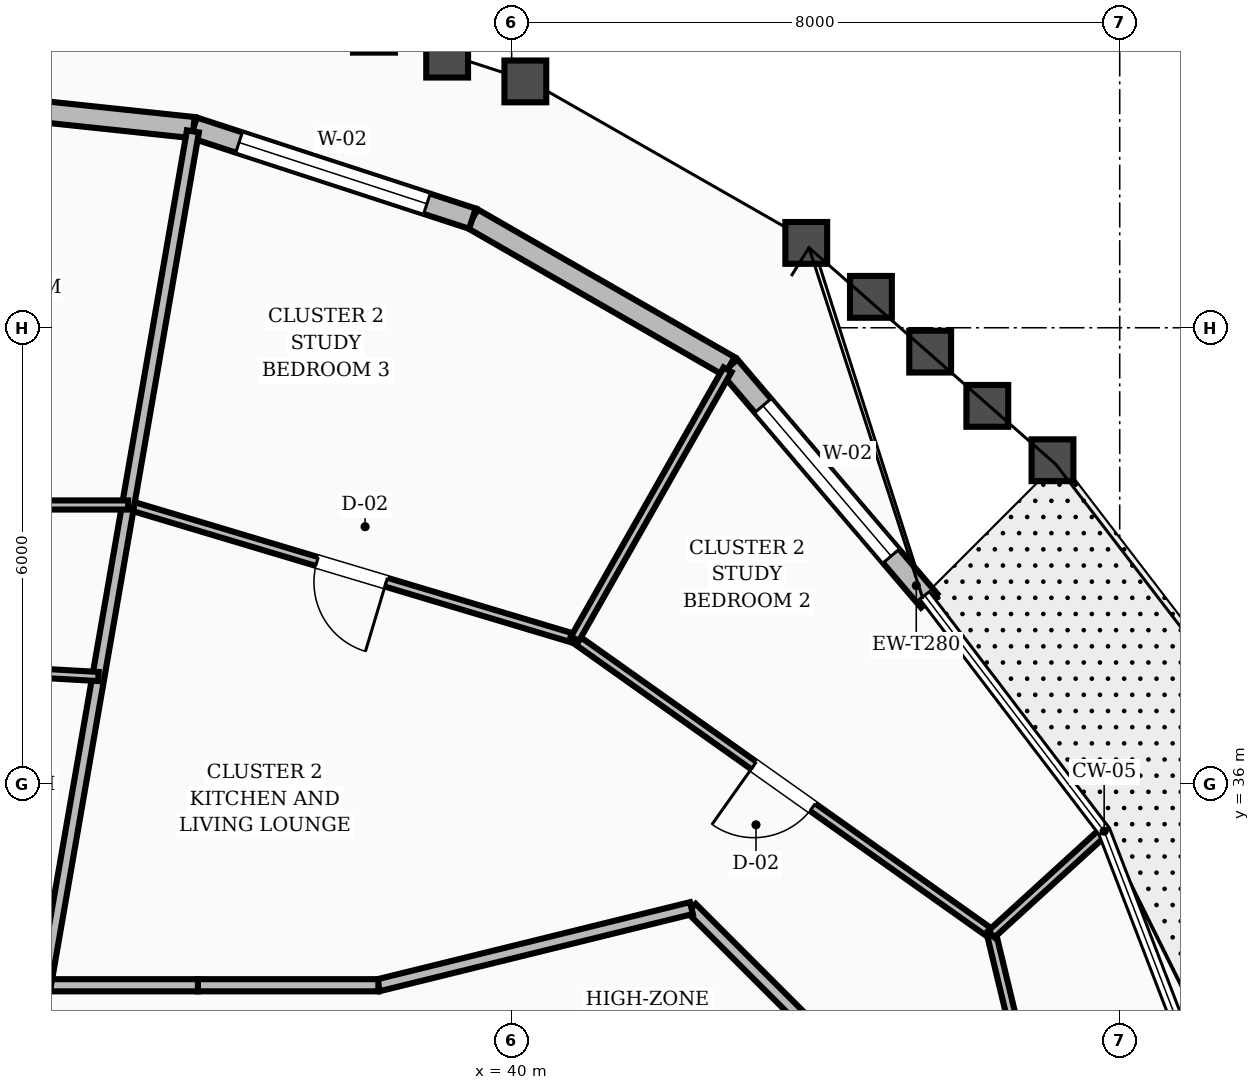
"""IFC4 building model, lengths in metres.
Left out: names, types, materials, properties, quantities, classifications, styles, units other than length and angle.
Written with IfcOpenShell. Run it as: python <this file> out.ifc"""

import sys

from ifc_helpers import new_model, si_unit, direction, frame, frame_2d, origin, place, context, subcontext, project, spatial, rectangle, extrude, element, fill, save


model = new_model("IFC4")
c1 = context("Model", 3, precision=1e-05, world=origin(), true_north=direction((0.0, 1.0)))
c2 = subcontext(c1, "Body", "Model", "MODEL_VIEW")
j1 = project(units=[si_unit("LENGTHUNIT", "METRE"), si_unit("PLANEANGLEUNIT", "RADIAN")], contexts=[c1])
p1 = place(None, origin())
s1 = spatial("IfcSite", under=j1, at=p1, CompositionType="ELEMENT")
p2 = place(p1, origin())
s2 = spatial("IfcBuilding", under=s1, at=p2, CompositionType="ELEMENT")
p3 = place(p2, frame((0.0, 0.0, 268.8)))
s3 = spatial("IfcBuildingStorey", under=s2, at=p3, CompositionType="ELEMENT", Elevation=268.8)
p4 = place(p3, frame((45.492, 38.409, 0.0), z_axis=(0.0, 0.0, 1.0), x_axis=(-0.648688961416, 0.761053632365, 0.0)))
e1 = element("IfcWall", 1, at=p4, inside=s3, PredefinedType="STANDARD", context=c2, shape_type="SweptSolid", body=[
    extrude(rectangle(XDim=4.05, YDim=0.28, at=frame_2d((2.025, 0.0))), origin(), (0.0, 0.0, 1.0), 2.88),
])
p5 = place(p4, frame((0.771, 0.0, 0.8)))
e2 = element("IfcOpeningElement", 2, at=p5, cuts=e1, PredefinedType="OPENING", context=c2, shape_type="SweptSolid", body=[
    extrude(rectangle(XDim=2.6, YDim=1.65, at=frame_2d((1.3, 0.825))), frame((0.0, 0.15, 0.0), z_axis=(0.0, -1.0, 0.0), x_axis=(1.0, 0.0, 0.0)), (0.0, 0.0, 1.0), 0.3),
])
p6 = place(p3, frame((42.865, 41.492, 0.0), z_axis=(0.0, 0.0, 1.0), x_axis=(-0.866911036779, 0.498462891608, 0.0)))
e3 = element("IfcWall", 3, at=p6, inside=s3, PredefinedType="STANDARD", context=c2, shape_type="SweptSolid", body=[
    extrude(rectangle(XDim=3.9, YDim=0.28, at=frame_2d((1.95, 0.0))), origin(), (0.0, 0.0, 1.0), 2.88),
])
p7 = place(p3, frame((39.484, 43.436, 0.0), z_axis=(0.0, 0.0, 1.0), x_axis=(-0.950681997555, 0.310167276684, 0.0)))
e4 = element("IfcWall", 4, at=p7, inside=s3, PredefinedType="STANDARD", context=c2, shape_type="SweptSolid", body=[
    extrude(rectangle(XDim=3.859, YDim=0.28, at=frame_2d((1.93, 0.0))), origin(), (0.0, 0.0, 1.0), 2.88),
])
p8 = place(p7, frame((0.63, 0.0, 0.8)))
e5 = element("IfcOpeningElement", 5, at=p8, cuts=e4, PredefinedType="OPENING", context=c2, shape_type="SweptSolid", body=[
    extrude(rectangle(XDim=2.6, YDim=1.65, at=frame_2d((1.3, 0.825))), frame((0.0, 0.15, 0.0), z_axis=(0.0, -1.0, 0.0), x_axis=(1.0, 0.0, 0.0)), (0.0, 0.0, 1.0), 0.3),
])
p9 = place(p3, frame((35.815, 44.633, 0.0), z_axis=(0.0, 0.0, 1.0), x_axis=(-0.99443198522, 0.105380390832, 0.0)))
e6 = element("IfcWall", 6, at=p9, inside=s3, PredefinedType="STANDARD", context=c2, shape_type="SweptSolid", body=[
    extrude(rectangle(XDim=3.836, YDim=0.28, at=frame_2d((1.918, 0.0))), origin(), (0.0, 0.0, 1.0), 2.88),
])
p10 = place(p3, frame((44.427, 32.303, 0.0), z_axis=(0.0, 0.0, 1.0), x_axis=(-0.707106781187, 0.707106781187, 0.0)))
e7 = element("IfcWall", 7, at=p10, inside=s3, PredefinedType="SOLIDWALL", context=c2, shape_type="SweptSolid", body=[
    extrude(rectangle(XDim=2.916, YDim=0.16, at=frame_2d((1.458, 0.0))), origin(), (0.0, 0.0, 1.0), 2.87),
])
p11 = place(p3, frame((42.365, 34.365, 0.0), z_axis=(0.0, 0.0, 1.0), x_axis=(-0.970939799552, -0.239323850978, 0.0)))
e8 = element("IfcWall", 8, at=p11, inside=s3, PredefinedType="SOLIDWALL", context=c2, shape_type="SweptSolid", body=[
    extrude(rectangle(XDim=4.241, YDim=0.16, at=frame_2d((2.12, 0.0))), origin(), (0.0, 0.0, 1.0), 2.87),
])
p12 = place(p3, frame((38.248, 33.35, 0.0), z_axis=(0.0, 0.0, 1.0), x_axis=(-1.0, 0.0, 0.0)))
e9 = element("IfcWall", 9, at=p12, inside=s3, PredefinedType="SOLIDWALL", context=c2, shape_type="SweptSolid", body=[
    extrude(rectangle(XDim=2.375, YDim=0.16, at=frame_2d((1.188, 0.0))), origin(), (0.0, 0.0, 1.0), 2.87),
])
p13 = place(p3, frame((35.873, 33.35, 0.0), z_axis=(0.0, 0.0, 1.0), x_axis=(-1.0, 0.0, 0.0)))
e10 = element("IfcWall", 10, at=p13, inside=s3, PredefinedType="SOLIDWALL", context=c2, shape_type="SweptSolid", body=[
    extrude(rectangle(XDim=2.013, YDim=0.16, at=frame_2d((1.006, 0.0))), origin(), (0.0, 0.0, 1.0), 2.87),
])
p14 = place(p3, frame((47.925, 27.329, 0.0), z_axis=(0.0, 0.0, 1.0), x_axis=(-0.234101002683, 0.972212281625, 0.0)))
e11 = element("IfcWall", 11, at=p14, inside=s3, PredefinedType="PARTITIONING", context=c2, shape_type="SweptSolid", body=[
    extrude(rectangle(XDim=6.886, YDim=0.12, at=frame_2d((3.443, 0.0))), origin(), (0.0, 0.0, 1.0), 2.87),
])
p15 = place(p14, frame((4.08, 0.0, 0.0)))
e12 = element("IfcOpeningElement", 12, at=p15, cuts=e11, PredefinedType="OPENING", context=c2, shape_type="SweptSolid", body=[
    extrude(rectangle(XDim=0.95, YDim=2.1, at=frame_2d((0.475, 1.05))), frame((0.0, 0.07, 0.0), z_axis=(0.0, -1.0, 0.0), x_axis=(1.0, 0.0, 0.0)), (0.0, 0.0, 1.0), 0.14),
])
p16 = place(p3, frame((46.313, 34.024, 0.0), z_axis=(0.0, 0.0, 1.0), x_axis=(-0.815764383374, 0.57838436253, 0.0)))
e13 = element("IfcWall", 13, at=p16, inside=s3, PredefinedType="PARTITIONING", context=c2, shape_type="SweptSolid", body=[
    extrude(rectangle(XDim=6.717, YDim=0.12, at=frame_2d((3.358, 0.0))), origin(), (0.0, 0.0, 1.0), 2.87),
])
p17 = place(p16, frame((2.884, 0.0, 0.0)))
e14 = element("IfcOpeningElement", 14, at=p17, cuts=e13, PredefinedType="OPENING", context=c2, shape_type="SweptSolid", body=[
    extrude(rectangle(XDim=0.95, YDim=2.1, at=frame_2d((0.475, 1.05))), frame((0.0, 0.07, 0.0), z_axis=(0.0, -1.0, 0.0), x_axis=(1.0, 0.0, 0.0)), (0.0, 0.0, 1.0), 0.14),
])
p18 = place(p3, frame((46.313, 34.024, 0.0), z_axis=(0.0, 0.0, 1.0), x_axis=(0.738747493853, 0.673982299713, 0.0)))
e15 = element("IfcWall", 15, at=p18, inside=s3, PredefinedType="PARTITIONING", context=c2, shape_type="SweptSolid", body=[
    extrude(rectangle(XDim=1.957, YDim=0.12, at=frame_2d((0.978, 0.0))), origin(), (0.0, 0.0, 1.0), 2.87),
])
p19 = place(p3, frame((40.833, 37.909, 0.0), z_axis=(0.0, 0.0, 1.0), x_axis=(-0.958019889786, 0.28670174533, 0.0)))
e16 = element("IfcWall", 16, at=p19, inside=s3, PredefinedType="PARTITIONING", context=c2, shape_type="SweptSolid", body=[
    extrude(rectangle(XDim=6.136, YDim=0.12, at=frame_2d((3.068, 0.0))), origin(), (0.0, 0.0, 1.0), 2.87),
])
p20 = place(p19, frame((2.593, 0.0, 0.0)))
e17 = element("IfcOpeningElement", 17, at=p20, cuts=e16, PredefinedType="OPENING", context=c2, shape_type="SweptSolid", body=[
    extrude(rectangle(XDim=0.95, YDim=2.1, at=frame_2d((0.475, 1.05))), frame((0.0, 0.07, 0.0), z_axis=(0.0, -1.0, 0.0), x_axis=(1.0, 0.0, 0.0)), (0.0, 0.0, 1.0), 0.14),
])
p21 = place(p3, frame((40.833, 37.909, 0.0), z_axis=(0.0, 0.0, 1.0), x_axis=(0.493338072586, 0.869837655047, 0.0)))
e18 = element("IfcWall", 18, at=p21, inside=s3, PredefinedType="PARTITIONING", context=c2, shape_type="SweptSolid", body=[
    extrude(rectangle(XDim=4.068, YDim=0.12, at=frame_2d((2.034, 0.0))), origin(), (0.0, 0.0, 1.0), 2.87),
])
p22 = place(p3, frame((33.86, 33.35, 0.0), z_axis=(0.0, 0.0, 1.0), x_axis=(0.170778130505, 0.98530950982, 0.0)))
e19 = element("IfcWall", 19, at=p22, inside=s3, PredefinedType="SOLIDWALL", context=c2, shape_type="SweptSolid", body=[
    extrude(rectangle(XDim=11.401, YDim=0.16, at=frame_2d((5.7, 0.0))), origin(), (0.0, 0.0, 1.0), 2.87),
])
p23 = place(p3, frame((34.564, 37.412, 0.0), z_axis=(0.0, 0.0, 1.0), x_axis=(-0.998393230763, 0.056665304784, 0.0)))
e20 = element("IfcWall", 20, at=p23, inside=s3, PredefinedType="PARTITIONING", context=c2, shape_type="SweptSolid", body=[
    extrude(rectangle(XDim=2.568, YDim=0.12, at=frame_2d((1.284, 0.0))), origin(), (0.0, 0.0, 1.0), 2.87),
])
p24 = place(p3, frame((34.955, 39.668, 0.0), z_axis=(0.0, 0.0, 1.0), x_axis=(-1.0, 0.0, 0.0)))
e21 = element("IfcWall", 21, at=p24, inside=s3, PredefinedType="PARTITIONING", context=c2, shape_type="SweptSolid", body=[
    extrude(rectangle(XDim=5.91, YDim=0.12, at=frame_2d((2.955, 0.0))), origin(), (0.0, 0.0, 1.0), 2.87),
])
p25 = place(p24, frame((3.377, 0.0, 0.0)))
e22 = element("IfcOpeningElement", 22, at=p25, cuts=e21, PredefinedType="OPENING", context=c2, shape_type="SweptSolid", body=[
    extrude(rectangle(XDim=0.95, YDim=2.1, at=frame_2d((0.475, 1.05))), frame((0.0, 0.07, 0.0), z_axis=(0.0, -1.0, 0.0), x_axis=(1.0, 0.0, 0.0)), (0.0, 0.0, 1.0), 0.14),
])
p26 = place(p5, origin())
e23 = element("IfcWindow", 23, at=p26, inside=s3, PartitioningType="SINGLE_PANEL", PredefinedType="WINDOW", context=c2, shape_type="SweptSolid", body=[
    extrude(rectangle(XDim=2.6, YDim=1.65, at=frame_2d((1.3, 0.825))), frame((0.0, 0.03, 0.0), z_axis=(0.0, -1.0, 0.0), x_axis=(1.0, 0.0, 0.0)), (0.0, 0.0, 1.0), 0.06),
])
fill(e2, e23)
p27 = place(p8, origin())
e24 = element("IfcWindow", 24, at=p27, inside=s3, PartitioningType="SINGLE_PANEL", PredefinedType="WINDOW", context=c2, shape_type="SweptSolid", body=[
    extrude(rectangle(XDim=2.6, YDim=1.65, at=frame_2d((1.3, 0.825))), frame((0.0, 0.03, 0.0), z_axis=(0.0, -1.0, 0.0), x_axis=(1.0, 0.0, 0.0)), (0.0, 0.0, 1.0), 0.06),
])
fill(e5, e24)
p28 = place(p17, origin())
e25 = element("IfcDoor", 25, at=p28, inside=s3, OperationType="SINGLE_SWING_RIGHT", PredefinedType="DOOR", context=c2, shape_type="SweptSolid", body=[
    extrude(rectangle(XDim=0.95, YDim=2.1, at=frame_2d((0.475, 1.05))), frame((0.0, 0.025, 0.0), z_axis=(0.0, -1.0, 0.0), x_axis=(1.0, 0.0, 0.0)), (0.0, 0.0, 1.0), 0.05),
])
fill(e14, e25)
p29 = place(p20, origin())
e26 = element("IfcDoor", 26, at=p29, inside=s3, OperationType="SINGLE_SWING_LEFT", PredefinedType="DOOR", context=c2, shape_type="SweptSolid", body=[
    extrude(rectangle(XDim=0.95, YDim=2.1, at=frame_2d((0.475, 1.05))), frame((0.0, 0.025, 0.0), z_axis=(0.0, -1.0, 0.0), x_axis=(1.0, 0.0, 0.0)), (0.0, 0.0, 1.0), 0.05),
])
fill(e17, e26)
save(model, sys.argv[1])
